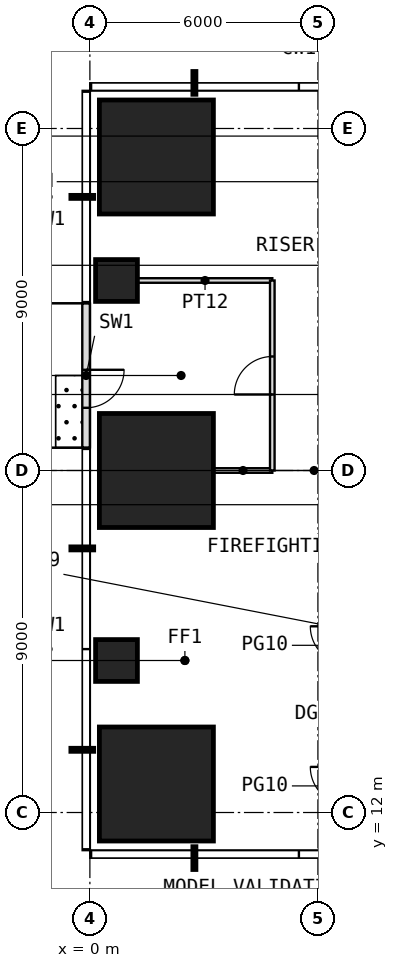
"""IFC4 building model, lengths in metres.
Left out: names, types, materials, properties, quantities, classifications, styles, units other than length and angle.
Written with IfcOpenShell. Run it as: python <this file> out.ifc"""

import sys

from ifc_helpers import new_model, si_unit, direction, frame, frame_2d, origin, origin_2d, place, context, subcontext, project, spatial, rectangle, extrude, element, fill, save


model = new_model("IFC4")
c1 = context("Model", 3, precision=1e-05, world=origin(), true_north=direction((0.0, 1.0)))
c2 = subcontext(c1, "Body", "Model", "MODEL_VIEW")
j1 = project(units=[si_unit("LENGTHUNIT", "METRE"), si_unit("PLANEANGLEUNIT", "RADIAN")], contexts=[c1])
p1 = place(None, origin())
s1 = spatial("IfcSite", under=j1, at=p1, CompositionType="ELEMENT")
p2 = place(p1, origin())
s2 = spatial("IfcBuilding", under=s1, at=p2, CompositionType="ELEMENT")
p3 = place(p2, frame((0.0, 0.0, 148.5)))
s3 = spatial("IfcBuildingStorey", under=s2, at=p3, CompositionType="ELEMENT", Elevation=148.5)
p4 = place(p3, frame((1.75, 12.75, 0.0), z_axis=(0.0, 0.0, 1.0), x_axis=(1.0, 0.0, 0.0)))
e1 = element("IfcColumn", 1, at=p4, inside=s3, PredefinedType="COLUMN", context=c2, shape_type="SweptSolid", body=[
    extrude(rectangle(XDim=3.0, YDim=3.0, at=origin_2d()), origin(), (0.0, 0.0, 1.0), 4.0),
])
p5 = place(p3, frame((0.7, 16.0, 0.0), z_axis=(0.0, 0.0, 1.0), x_axis=(1.0, 0.0, 0.0)))
e2 = element("IfcColumn", 2, at=p5, inside=s3, PredefinedType="COLUMN", context=c2, shape_type="SweptSolid", body=[
    extrude(rectangle(XDim=1.1, YDim=1.1, at=origin_2d()), origin(), (0.0, 0.0, 1.0), 4.0),
])
p6 = place(p3, frame((1.75, 21.0, 0.0), z_axis=(0.0, 0.0, 1.0), x_axis=(1.0, 0.0, 0.0)))
e3 = element("IfcColumn", 3, at=p6, inside=s3, PredefinedType="COLUMN", context=c2, shape_type="SweptSolid", body=[
    extrude(rectangle(XDim=3.0, YDim=3.0, at=origin_2d()), origin(), (0.0, 0.0, 1.0), 4.0),
])
p7 = place(p3, frame((0.7, 26.0, 0.0), z_axis=(0.0, 0.0, 1.0), x_axis=(1.0, 0.0, 0.0)))
e4 = element("IfcColumn", 4, at=p7, inside=s3, PredefinedType="COLUMN", context=c2, shape_type="SweptSolid", body=[
    extrude(rectangle(XDim=1.1, YDim=1.1, at=origin_2d()), origin(), (0.0, 0.0, 1.0), 4.0),
])
p8 = place(p3, frame((1.75, 29.25, 0.0), z_axis=(0.0, 0.0, 1.0), x_axis=(1.0, 0.0, 0.0)))
e5 = element("IfcColumn", 5, at=p8, inside=s3, PredefinedType="COLUMN", context=c2, shape_type="SweptSolid", body=[
    extrude(rectangle(XDim=3.0, YDim=3.0, at=origin_2d()), origin(), (0.0, 0.0, 1.0), 4.0),
])
p9 = place(p3, frame((-0.1, 25.4, 0.0), z_axis=(0.0, 0.0, 1.0), x_axis=(0.0, -1.0, 0.0)))
e6 = element("IfcWall", 6, at=p9, inside=s3, PredefinedType="USERDEFINED", context=c2, shape_type="SweptSolid", body=[
    extrude(rectangle(XDim=3.8, YDim=0.2, at=frame_2d((1.9, 0.0))), origin(), (0.0, 0.0, 1.0), 3.75),
])
p10 = place(p9, frame((1.75, 0.0, 0.0)))
e7 = element("IfcOpeningElement", 7, at=p10, cuts=e6, PredefinedType="OPENING", context=c2, shape_type="SweptSolid", body=[
    extrude(rectangle(XDim=1.0, YDim=2.4, at=frame_2d((0.5, 1.2))), frame((0.0, 0.11, 0.0), z_axis=(0.0, -1.0, 0.0), x_axis=(1.0, 0.0, 0.0)), (0.0, 0.0, 1.0), 0.22),
])
p11 = place(p3, frame((1.26, 26.0, 0.0), z_axis=(0.0, 0.0, 1.0), x_axis=(1.0, 0.0, 0.0)))
e8 = element("IfcWall", 8, at=p11, inside=s3, PredefinedType="PARTITIONING", context=c2, shape_type="SweptSolid", body=[
    extrude(rectangle(XDim=3.54, YDim=0.12, at=frame_2d((1.77, 0.0))), origin(), (0.0, 0.0, 1.0), 3.75),
])
p12 = place(p3, frame((3.26, 21.0, 0.0), z_axis=(0.0, 0.0, 1.0), x_axis=(1.0, 0.0, 0.0)))
e9 = element("IfcWall", 9, at=p12, inside=s3, PredefinedType="PARTITIONING", context=c2, shape_type="SweptSolid", body=[
    extrude(rectangle(XDim=1.54, YDim=0.12, at=frame_2d((0.77, 0.0))), origin(), (0.0, 0.0, 1.0), 3.75),
])
p13 = place(p3, frame((4.8, 21.0, 0.0), z_axis=(0.0, 0.0, 1.0), x_axis=(0.0, 1.0, 0.0)))
e10 = element("IfcWall", 10, at=p13, inside=s3, PredefinedType="PARTITIONING", context=c2, shape_type="SweptSolid", body=[
    extrude(rectangle(XDim=5.0, YDim=0.12, at=frame_2d((2.5, 0.0))), origin(), (0.0, 0.0, 1.0), 3.75),
])
p14 = place(p13, frame((2.0, 0.0, 0.0)))
e11 = element("IfcOpeningElement", 11, at=p14, cuts=e10, PredefinedType="OPENING", context=c2, shape_type="SweptSolid", body=[
    extrude(rectangle(XDim=1.0, YDim=2.2, at=frame_2d((0.5, 1.1))), frame((0.0, 0.07, 0.0), z_axis=(0.0, -1.0, 0.0), x_axis=(1.0, 0.0, 0.0)), (0.0, 0.0, 1.0), 0.14),
])
p15 = place(p10, origin())
e12 = element("IfcDoor", 12, at=p15, inside=s3, OperationType="SINGLE_SWING_LEFT", PredefinedType="DOOR", context=c2, shape_type="SweptSolid", body=[
    extrude(rectangle(XDim=1.0, YDim=2.4, at=frame_2d((0.5, 1.2))), frame((0.0, 0.025, 0.0), z_axis=(0.0, -1.0, 0.0), x_axis=(1.0, 0.0, 0.0)), (0.0, 0.0, 1.0), 0.05),
])
fill(e7, e12)
p16 = place(p14, origin())
e13 = element("IfcDoor", 13, at=p16, inside=s3, OperationType="SINGLE_SWING_LEFT", PredefinedType="DOOR", context=c2, shape_type="SweptSolid", body=[
    extrude(rectangle(XDim=1.0, YDim=2.2, at=frame_2d((0.5, 1.1))), frame((0.0, 0.025, 0.0), z_axis=(0.0, -1.0, 0.0), x_axis=(1.0, 0.0, 0.0)), (0.0, 0.0, 1.0), 0.05),
])
fill(e11, e13)
save(model, sys.argv[1])
